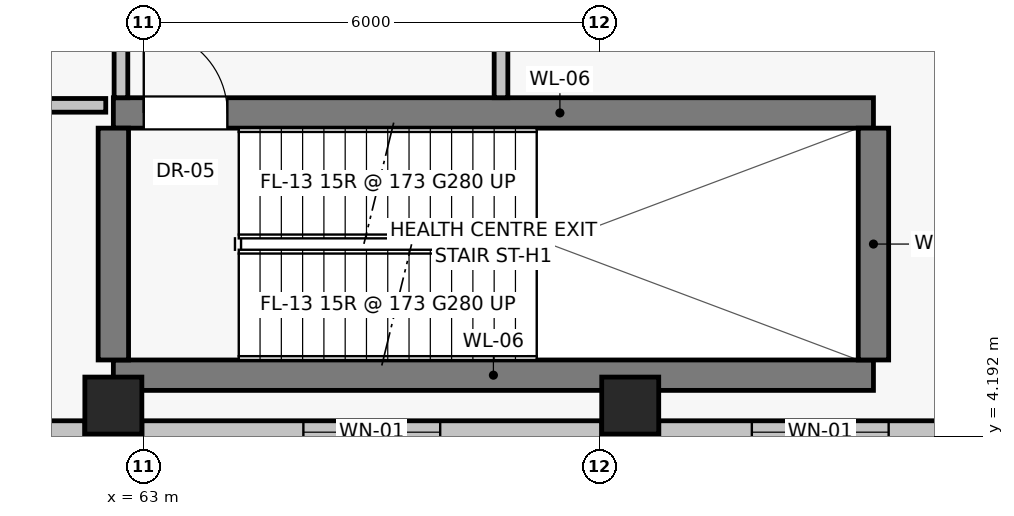
"""IFC4 building model, lengths in metres.
Left out: names, types, materials, properties, quantities, classifications, styles, units other than length and angle.
Written with IfcOpenShell. Run it as: python <this file> out.ifc"""

import sys

from ifc_helpers import new_model, si_unit, direction, frame, frame_2d, origin, origin_2d, place, context, subcontext, project, spatial, rectangle, extrude, source, transform, mapped, element, fill, save


model = new_model("IFC4")
c1 = context("Model", 3, precision=1e-05, world=origin(), true_north=direction((0.0, 1.0)))
c2 = subcontext(c1, "Body", "Model", "MODEL_VIEW")
j1 = project(units=[si_unit("LENGTHUNIT", "METRE"), si_unit("PLANEANGLEUNIT", "RADIAN")], contexts=[c1])
p1 = place(None, origin())
s1 = spatial("IfcSite", under=j1, at=p1, CompositionType="ELEMENT")
p2 = place(p1, origin())
s2 = spatial("IfcBuilding", under=s1, at=p2, CompositionType="ELEMENT")
p3 = place(p2, origin())
s3 = spatial("IfcBuildingStorey", under=s2, at=p3, CompositionType="ELEMENT", Elevation=0.0)
for number, where, z_axis, x_axis in (
    (1, (62.6, 4.6, 0.0), (0.0, 0.0, 1.0), (1.0, 0.0, 0.0)),
    (2, (69.4, 4.6, 0.0), (0.0, 0.0, 1.0), (1.0, 0.0, 0.0)),
):
    element("IfcColumn", number, at=place(p3, frame(where, z_axis=z_axis, x_axis=x_axis)), inside=s3, PredefinedType="COLUMN", context=c2, shape_type="SweptSolid", body=[
        extrude(rectangle(XDim=0.75, YDim=0.75, at=origin_2d()), origin(), (0.0, 0.0, 1.0), 5.2),
    ])
p4 = place(p3, frame((57.0, 4.25, 0.0), z_axis=(0.0, 0.0, 1.0), x_axis=(1.0, 0.0, 0.0)))
e3 = element("IfcWall", 3, at=p4, inside=s3, PredefinedType="SOLIDWALL", context=c2, shape_type="SweptSolid", body=[
    extrude(rectangle(XDim=5.225, YDim=0.3, at=frame_2d((2.613, 0.0))), origin(), (0.0, 0.0, 1.0), 4.15),
])
p5 = place(p4, frame((2.4, 0.0, 0.0)))
e4 = element("IfcOpeningElement", 4, at=p5, cuts=e3, PredefinedType="OPENING", context=c2, shape_type="SweptSolid", body=[
    extrude(rectangle(XDim=1.4, YDim=2.3, at=frame_2d((0.7, 1.15))), frame((0.0, 0.16, 0.0), z_axis=(0.0, -1.0, 0.0), x_axis=(1.0, 0.0, 0.0)), (0.0, 0.0, 1.0), 0.32),
])
p6 = place(p3, frame((62.975, 4.25, 0.0), z_axis=(0.0, 0.0, 1.0), x_axis=(1.0, 0.0, 0.0)))
e5 = element("IfcWall", 5, at=p6, inside=s3, PredefinedType="SOLIDWALL", context=c2, shape_type="SweptSolid", body=[
    extrude(rectangle(XDim=6.05, YDim=0.3, at=frame_2d((3.025, 0.0))), origin(), (0.0, 0.0, 1.0), 4.15),
])
p7 = place(p6, frame((2.125, 0.0, 0.85)))
e6 = element("IfcOpeningElement", 6, at=p7, cuts=e5, PredefinedType="OPENING", context=c2, shape_type="SweptSolid", body=[
    extrude(rectangle(XDim=1.8, YDim=1.65, at=frame_2d((0.9, 0.825))), frame((0.0, 0.16, 0.0), z_axis=(0.0, -1.0, 0.0), x_axis=(1.0, 0.0, 0.0)), (0.0, 0.0, 1.0), 0.32),
])
p8 = place(p3, frame((69.775, 4.25, 0.0), z_axis=(0.0, 0.0, 1.0), x_axis=(1.0, 0.0, 0.0)))
e7 = element("IfcWall", 7, at=p8, inside=s3, PredefinedType="SOLIDWALL", context=c2, shape_type="SweptSolid", body=[
    extrude(rectangle(XDim=5.225, YDim=0.3, at=frame_2d((2.613, 0.0))), origin(), (0.0, 0.0, 1.0), 4.15),
])
p9 = place(p8, frame((1.225, 0.0, 0.85)))
e8 = element("IfcOpeningElement", 8, at=p9, cuts=e7, PredefinedType="OPENING", context=c2, shape_type="SweptSolid", body=[
    extrude(rectangle(XDim=1.8, YDim=1.65, at=frame_2d((0.9, 0.825))), frame((0.0, 0.16, 0.0), z_axis=(0.0, -1.0, 0.0), x_axis=(1.0, 0.0, 0.0)), (0.0, 0.0, 1.0), 0.32),
])
p10 = place(p3, frame((62.6, 5.0, 0.0), z_axis=(0.0, 0.0, 1.0), x_axis=(1.0, 0.0, 0.0)))
e9 = element("IfcWall", 9, at=p10, inside=s3, PredefinedType="SHEAR", context=c2, shape_type="SweptSolid", body=[
    extrude(rectangle(XDim=10.0, YDim=0.4, at=frame_2d((5.0, 0.0))), origin(), (0.0, 0.0, 1.0), 4.9),
])
p11 = place(p3, frame((62.6, 8.45, 0.0), z_axis=(0.0, 0.0, 1.0), x_axis=(1.0, 0.0, 0.0)))
e10 = element("IfcWall", 10, at=p11, inside=s3, PredefinedType="SHEAR", context=c2, shape_type="SweptSolid", body=[
    extrude(rectangle(XDim=10.0, YDim=0.4, at=frame_2d((5.0, 0.0))), origin(), (0.0, 0.0, 1.0), 4.9),
])
p12 = place(p11, frame((0.4, 0.0, 0.0)))
e11 = element("IfcOpeningElement", 11, at=p12, cuts=e10, PredefinedType="OPENING", context=c2, shape_type="SweptSolid", body=[
    extrude(rectangle(XDim=1.1, YDim=2.03, at=frame_2d((0.55, 1.015))), frame((0.0, 0.21, 0.0), z_axis=(0.0, -1.0, 0.0), x_axis=(1.0, 0.0, 0.0)), (0.0, 0.0, 1.0), 0.42),
])
for number, where, z_axis, x_axis in (
    (12, (62.6, 5.2, 0.0), (0.0, 0.0, 1.0), (0.0, 1.0, 0.0)),
    (13, (72.6, 5.2, 0.0), (0.0, 0.0, 1.0), (0.0, 1.0, 0.0)),
):
    element("IfcWall", number, at=place(p3, frame(where, z_axis=z_axis, x_axis=x_axis)), inside=s3, PredefinedType="SHEAR", context=c2, shape_type="SweptSolid", body=[
        extrude(rectangle(XDim=3.05, YDim=0.4, at=frame_2d((1.525, 0.0))), origin(), (0.0, 0.0, 1.0), 4.9),
    ])
p13 = place(p3, frame((57.45, 8.55, 0.0), z_axis=(0.0, 0.0, 1.0), x_axis=(1.0, 0.0, 0.0)))
e14 = element("IfcWall", 14, at=p13, inside=s3, PredefinedType="PARTITIONING", context=c2, shape_type="SweptSolid", body=[
    extrude(rectangle(XDim=5.05, YDim=0.18, at=frame_2d((2.525, 0.0))), origin(), (0.0, 0.0, 1.0), 4.9),
])
p14 = place(p3, frame((62.7, 8.65, 0.0), z_axis=(0.0, 0.0, 1.0), x_axis=(0.0, 1.0, 0.0)))
e15 = element("IfcWall", 15, at=p14, inside=s3, PredefinedType="PARTITIONING", context=c2, shape_type="SweptSolid", body=[
    extrude(rectangle(XDim=3.1, YDim=0.18, at=frame_2d((1.55, 0.0))), origin(), (0.0, 0.0, 1.0), 4.3),
])
p15 = place(p14, frame((1.0, 0.0, 0.0)))
e16 = element("IfcOpeningElement", 16, at=p15, cuts=e15, PredefinedType="OPENING", context=c2, shape_type="SweptSolid", body=[
    extrude(rectangle(XDim=1.0, YDim=2.01, at=frame_2d((0.5, 1.005))), frame((0.0, 0.1, 0.0), z_axis=(0.0, -1.0, 0.0), x_axis=(1.0, 0.0, 0.0)), (0.0, 0.0, 1.0), 0.2),
])
p16 = place(p3, frame((67.7, 8.65, 0.0), z_axis=(0.0, 0.0, 1.0), x_axis=(0.0, 1.0, 0.0)))
e17 = element("IfcWall", 17, at=p16, inside=s3, PredefinedType="PARTITIONING", context=c2, shape_type="SweptSolid", body=[
    extrude(rectangle(XDim=14.2, YDim=0.18, at=frame_2d((7.1, 0.0))), origin(), (0.0, 0.0, 1.0), 4.9),
])
p17 = place(p16, frame((5.5, 0.0, 0.0)))
e18 = element("IfcOpeningElement", 18, at=p17, cuts=e17, PredefinedType="OPENING", context=c2, shape_type="SweptSolid", body=[
    extrude(rectangle(XDim=1.0, YDim=2.01, at=frame_2d((0.5, 1.005))), frame((0.0, 0.1, 0.0), z_axis=(0.0, -1.0, 0.0), x_axis=(1.0, 0.0, 0.0)), (0.0, 0.0, 1.0), 0.2),
])
m1 = source(origin(), c2, "Body", "SweptSolid", [
    extrude(rectangle(XDim=1.8, YDim=1.65, at=frame_2d((0.9, 0.825))), frame((0.0, 0.03, 0.0), z_axis=(0.0, -1.0, 0.0), x_axis=(1.0, 0.0, 0.0)), (0.0, 0.0, 1.0), 0.06),
])
p18 = place(p7, origin())
e19 = element("IfcWindow", 19, at=p18, inside=s3, PartitioningType="DOUBLE_PANEL_VERTICAL", PredefinedType="WINDOW", context=c2, shape_type="MappedRepresentation", body=[
    mapped(m1, transform((0.0, 0.0, 0.0), scale=1.0)),
])
fill(e6, e19)
p19 = place(p9, origin())
e20 = element("IfcWindow", 20, at=p19, inside=s3, PartitioningType="DOUBLE_PANEL_VERTICAL", PredefinedType="WINDOW", context=c2, shape_type="MappedRepresentation", body=[
    mapped(m1, transform((0.0, 0.0, 0.0), scale=1.0)),
])
fill(e8, e20)
m2 = source(origin(), c2, "Body", "SweptSolid", [
    extrude(rectangle(XDim=1.1, YDim=2.03, at=frame_2d((0.55, 1.015))), frame((0.0, 0.025, 0.0), z_axis=(0.0, -1.0, 0.0), x_axis=(1.0, 0.0, 0.0)), (0.0, 0.0, 1.0), 0.05),
])
p20 = place(p12, origin())
e21 = element("IfcDoor", 21, at=p20, inside=s3, OperationType="SINGLE_SWING_LEFT", PredefinedType="DOOR", context=c2, shape_type="MappedRepresentation", body=[
    mapped(m2, transform((0.0, 0.0, 0.0), scale=1.0)),
])
fill(e11, e21)
save(model, sys.argv[1])
